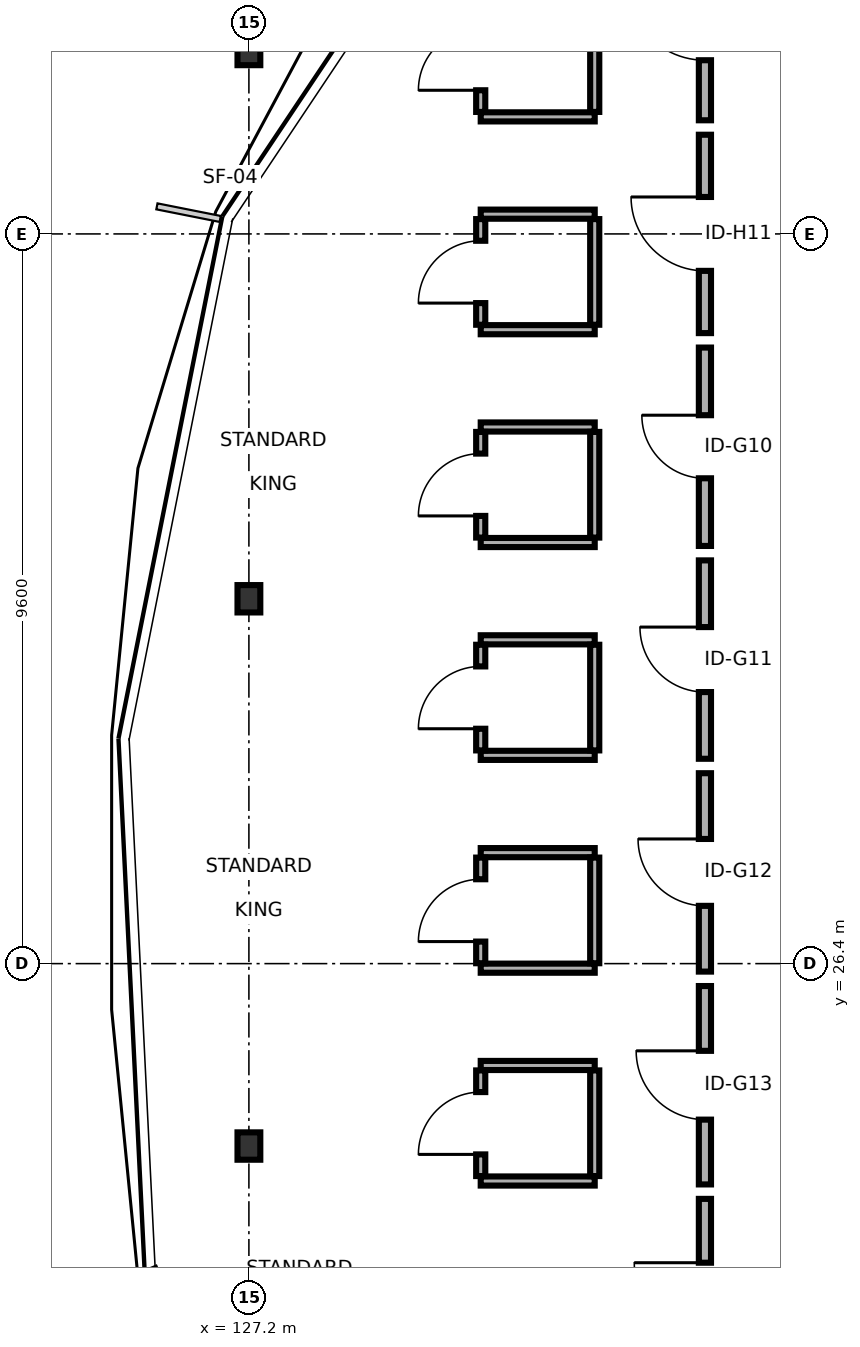
"""IFC4 building model, lengths in metres.
Left out: names, types, materials, properties, quantities, classifications, styles, units other than length and angle.
Written with IfcOpenShell. Run it as: python <this file> out.ifc"""

import sys

from ifc_helpers import new_model, si_unit, direction, frame, frame_2d, origin, origin_2d, place, context, subcontext, project, spatial, rectangle, i_section, extrude, element, fill, save


model = new_model("IFC4")
c1 = context("Model", 3, precision=1e-05, world=origin(), true_north=direction((0.0, 1.0)))
c2 = subcontext(c1, "Body", "Model", "MODEL_VIEW")
j1 = project(units=[si_unit("LENGTHUNIT", "METRE"), si_unit("PLANEANGLEUNIT", "RADIAN")], contexts=[c1])
p1 = place(None, origin())
s1 = spatial("IfcSite", under=j1, at=p1, CompositionType="ELEMENT")
p2 = place(p1, origin())
s2 = spatial("IfcBuilding", under=s1, at=p2, CompositionType="ELEMENT")
p3 = place(p2, frame((0.0, 0.0, 38.5)))
s3 = spatial("IfcBuildingStorey", under=s2, at=p3, CompositionType="ELEMENT", Elevation=38.5)
for number, where, z_axis, x_axis in (
    (1, (127.2, 38.4, 0.0), (0.0, 0.0, 1.0), (1.0, 0.0, 0.0)),
    (2, (127.2, 31.2, 0.0), (0.0, 0.0, 1.0), (1.0, 0.0, 0.0)),
    (3, (127.2, 24.0, 0.0), (0.0, 0.0, 1.0), (1.0, 0.0, 0.0)),
):
    element("IfcColumn", number, at=place(p3, frame(where, z_axis=z_axis, x_axis=x_axis)), inside=s3, PredefinedType="COLUMN", context=c2, shape_type="SweptSolid", body=[
        extrude(i_section(OverallWidth=0.3, OverallDepth=0.36, WebThickness=0.012, FlangeThickness=0.022, FilletRadius=0.027, at=origin_2d()), origin(), (0.0, 0.0, 1.0), 3.4),
    ])
p4 = place(p3, frame((133.2, 37.495, 0.0), z_axis=(0.0, 0.0, 1.0), x_axis=(0.0, 1.0, 0.0)))
e4 = element("IfcWall", 4, at=p4, inside=s3, PredefinedType="PARTITIONING", context=c2, shape_type="SweptSolid", body=[
    extrude(rectangle(XDim=2.61, YDim=0.16, at=frame_2d((1.305, 0.0))), origin(), (0.0, 0.0, 1.0), 2.735),
])
p5 = place(p4, frame((0.79, 0.0, 0.0)))
e5 = element("IfcOpeningElement", 5, at=p5, cuts=e4, PredefinedType="OPENING", context=c2, shape_type="SweptSolid", body=[
    extrude(rectangle(XDim=1.03, YDim=2.05, at=frame_2d((0.515, 1.025))), frame((0.0, 0.09, 0.0), z_axis=(0.0, -1.0, 0.0), x_axis=(1.0, 0.0, 0.0)), (0.0, 0.0, 1.0), 0.18),
])
p6 = place(p3, frame((130.25, 37.54, 0.0), z_axis=(0.0, 0.0, 1.0), x_axis=(1.0, 0.0, 0.0)))
e6 = element("IfcWall", 6, at=p6, inside=s3, PredefinedType="PARTITIONING", context=c2, shape_type="SweptSolid", body=[
    extrude(rectangle(XDim=1.5, YDim=0.12, at=frame_2d((0.75, 0.0))), origin(), (0.0, 0.0, 1.0), 3.15),
])
p7 = place(p3, frame((130.25, 37.605, 0.0), z_axis=(0.0, 0.0, 1.0), x_axis=(0.0, 1.0, 0.0)))
e7 = element("IfcWall", 7, at=p7, inside=s3, PredefinedType="PARTITIONING", context=c2, shape_type="SweptSolid", body=[
    extrude(rectangle(XDim=1.39, YDim=0.12, at=frame_2d((0.695, 0.0))), origin(), (0.0, 0.0, 1.0), 2.735),
])
p8 = place(p7, frame((0.285, 0.0, 0.0)))
e8 = element("IfcOpeningElement", 8, at=p8, cuts=e7, PredefinedType="OPENING", context=c2, shape_type="SweptSolid", body=[
    extrude(rectangle(XDim=0.82, YDim=2.08, at=frame_2d((0.41, 1.04))), frame((0.0, 0.07, 0.0), z_axis=(0.0, -1.0, 0.0), x_axis=(1.0, 0.0, 0.0)), (0.0, 0.0, 1.0), 0.14),
])
p9 = place(p3, frame((131.75, 37.605, 0.0), z_axis=(0.0, 0.0, 1.0), x_axis=(0.0, 1.0, 0.0)))
e9 = element("IfcWall", 9, at=p9, inside=s3, PredefinedType="PARTITIONING", context=c2, shape_type="SweptSolid", body=[
    extrude(rectangle(XDim=1.39, YDim=0.12, at=frame_2d((0.695, 0.0))), origin(), (0.0, 0.0, 1.0), 2.735),
])
p10 = place(p3, frame((133.2, 34.695, 0.0), z_axis=(0.0, 0.0, 1.0), x_axis=(0.0, 1.0, 0.0)))
e10 = element("IfcWall", 10, at=p10, inside=s3, PredefinedType="PARTITIONING", context=c2, shape_type="SweptSolid", body=[
    extrude(rectangle(XDim=2.61, YDim=0.16, at=frame_2d((1.305, 0.0))), origin(), (0.0, 0.0, 1.0), 3.15),
])
p11 = place(p10, frame((0.819, 0.0, 0.0)))
e11 = element("IfcOpeningElement", 11, at=p11, cuts=e10, PredefinedType="OPENING", context=c2, shape_type="SweptSolid", body=[
    extrude(rectangle(XDim=0.972, YDim=2.16, at=frame_2d((0.486, 1.08))), frame((0.0, 0.09, 0.0), z_axis=(0.0, -1.0, 0.0), x_axis=(1.0, 0.0, 0.0)), (0.0, 0.0, 1.0), 0.18),
])
for number, where, z_axis, x_axis in (
    (12, (130.25, 34.74, 0.0), (0.0, 0.0, 1.0), (1.0, 0.0, 0.0)),
    (13, (130.25, 36.26, 0.0), (0.0, 0.0, 1.0), (1.0, 0.0, 0.0)),
):
    element("IfcWall", number, at=place(p3, frame(where, z_axis=z_axis, x_axis=x_axis)), inside=s3, PredefinedType="PARTITIONING", context=c2, shape_type="SweptSolid", body=[
        extrude(rectangle(XDim=1.5, YDim=0.12, at=frame_2d((0.75, 0.0))), origin(), (0.0, 0.0, 1.0), 3.15),
    ])
p12 = place(p3, frame((130.25, 34.805, 0.0), z_axis=(0.0, 0.0, 1.0), x_axis=(0.0, 1.0, 0.0)))
e14 = element("IfcWall", 14, at=p12, inside=s3, PredefinedType="PARTITIONING", context=c2, shape_type="SweptSolid", body=[
    extrude(rectangle(XDim=1.39, YDim=0.12, at=frame_2d((0.695, 0.0))), origin(), (0.0, 0.0, 1.0), 3.15),
])
p13 = place(p12, frame((0.285, 0.0, 0.0)))
e15 = element("IfcOpeningElement", 15, at=p13, cuts=e14, PredefinedType="OPENING", context=c2, shape_type="SweptSolid", body=[
    extrude(rectangle(XDim=0.82, YDim=2.08, at=frame_2d((0.41, 1.04))), frame((0.0, 0.07, 0.0), z_axis=(0.0, -1.0, 0.0), x_axis=(1.0, 0.0, 0.0)), (0.0, 0.0, 1.0), 0.14),
])
p14 = place(p3, frame((131.75, 34.805, 0.0), z_axis=(0.0, 0.0, 1.0), x_axis=(0.0, 1.0, 0.0)))
e16 = element("IfcWall", 16, at=p14, inside=s3, PredefinedType="PARTITIONING", context=c2, shape_type="SweptSolid", body=[
    extrude(rectangle(XDim=1.39, YDim=0.12, at=frame_2d((0.695, 0.0))), origin(), (0.0, 0.0, 1.0), 3.15),
])
p15 = place(p3, frame((133.2, 31.895, 0.0), z_axis=(0.0, 0.0, 1.0), x_axis=(0.0, 1.0, 0.0)))
e17 = element("IfcWall", 17, at=p15, inside=s3, PredefinedType="PARTITIONING", context=c2, shape_type="SweptSolid", body=[
    extrude(rectangle(XDim=2.61, YDim=0.16, at=frame_2d((1.305, 0.0))), origin(), (0.0, 0.0, 1.0), 3.15),
])
p16 = place(p15, frame((0.89, 0.0, 0.0)))
e18 = element("IfcOpeningElement", 18, at=p16, cuts=e17, PredefinedType="OPENING", context=c2, shape_type="SweptSolid", body=[
    extrude(rectangle(XDim=0.83, YDim=2.11, at=frame_2d((0.415, 1.055))), frame((0.0, 0.09, 0.0), z_axis=(0.0, -1.0, 0.0), x_axis=(1.0, 0.0, 0.0)), (0.0, 0.0, 1.0), 0.18),
])
for number, where, z_axis, x_axis in (
    (19, (130.25, 31.94, 0.0), (0.0, 0.0, 1.0), (1.0, 0.0, 0.0)),
    (20, (130.25, 33.46, 0.0), (0.0, 0.0, 1.0), (1.0, 0.0, 0.0)),
):
    element("IfcWall", number, at=place(p3, frame(where, z_axis=z_axis, x_axis=x_axis)), inside=s3, PredefinedType="PARTITIONING", context=c2, shape_type="SweptSolid", body=[
        extrude(rectangle(XDim=1.5, YDim=0.12, at=frame_2d((0.75, 0.0))), origin(), (0.0, 0.0, 1.0), 3.15),
    ])
p17 = place(p3, frame((130.25, 32.005, 0.0), z_axis=(0.0, 0.0, 1.0), x_axis=(0.0, 1.0, 0.0)))
e21 = element("IfcWall", 21, at=p17, inside=s3, PredefinedType="PARTITIONING", context=c2, shape_type="SweptSolid", body=[
    extrude(rectangle(XDim=1.39, YDim=0.12, at=frame_2d((0.695, 0.0))), origin(), (0.0, 0.0, 1.0), 3.15),
])
p18 = place(p17, frame((0.285, 0.0, 0.0)))
e22 = element("IfcOpeningElement", 22, at=p18, cuts=e21, PredefinedType="OPENING", context=c2, shape_type="SweptSolid", body=[
    extrude(rectangle(XDim=0.82, YDim=2.08, at=frame_2d((0.41, 1.04))), frame((0.0, 0.07, 0.0), z_axis=(0.0, -1.0, 0.0), x_axis=(1.0, 0.0, 0.0)), (0.0, 0.0, 1.0), 0.14),
])
p19 = place(p3, frame((131.75, 32.005, 0.0), z_axis=(0.0, 0.0, 1.0), x_axis=(0.0, 1.0, 0.0)))
e23 = element("IfcWall", 23, at=p19, inside=s3, PredefinedType="PARTITIONING", context=c2, shape_type="SweptSolid", body=[
    extrude(rectangle(XDim=1.39, YDim=0.12, at=frame_2d((0.695, 0.0))), origin(), (0.0, 0.0, 1.0), 3.15),
])
p20 = place(p3, frame((133.2, 29.095, 0.0), z_axis=(0.0, 0.0, 1.0), x_axis=(0.0, 1.0, 0.0)))
e24 = element("IfcWall", 24, at=p20, inside=s3, PredefinedType="PARTITIONING", context=c2, shape_type="SweptSolid", body=[
    extrude(rectangle(XDim=2.61, YDim=0.16, at=frame_2d((1.305, 0.0))), origin(), (0.0, 0.0, 1.0), 2.735),
])
p21 = place(p20, frame((0.877, 0.0, 0.0)))
e25 = element("IfcOpeningElement", 25, at=p21, cuts=e24, PredefinedType="OPENING", context=c2, shape_type="SweptSolid", body=[
    extrude(rectangle(XDim=0.855, YDim=2.11, at=frame_2d((0.427, 1.055))), frame((0.0, 0.09, 0.0), z_axis=(0.0, -1.0, 0.0), x_axis=(1.0, 0.0, 0.0)), (0.0, 0.0, 1.0), 0.18),
])
for number, where, z_axis, x_axis in (
    (26, (130.25, 29.14, 0.0), (0.0, 0.0, 1.0), (1.0, 0.0, 0.0)),
    (27, (130.25, 30.66, 0.0), (0.0, 0.0, 1.0), (1.0, 0.0, 0.0)),
):
    element("IfcWall", number, at=place(p3, frame(where, z_axis=z_axis, x_axis=x_axis)), inside=s3, PredefinedType="PARTITIONING", context=c2, shape_type="SweptSolid", body=[
        extrude(rectangle(XDim=1.5, YDim=0.12, at=frame_2d((0.75, 0.0))), origin(), (0.0, 0.0, 1.0), 3.15),
    ])
p22 = place(p3, frame((130.25, 29.205, 0.0), z_axis=(0.0, 0.0, 1.0), x_axis=(0.0, 1.0, 0.0)))
e28 = element("IfcWall", 28, at=p22, inside=s3, PredefinedType="PARTITIONING", context=c2, shape_type="SweptSolid", body=[
    extrude(rectangle(XDim=1.39, YDim=0.12, at=frame_2d((0.695, 0.0))), origin(), (0.0, 0.0, 1.0), 3.15),
])
p23 = place(p22, frame((0.285, 0.0, 0.0)))
e29 = element("IfcOpeningElement", 29, at=p23, cuts=e28, PredefinedType="OPENING", context=c2, shape_type="SweptSolid", body=[
    extrude(rectangle(XDim=0.82, YDim=2.08, at=frame_2d((0.41, 1.04))), frame((0.0, 0.07, 0.0), z_axis=(0.0, -1.0, 0.0), x_axis=(1.0, 0.0, 0.0)), (0.0, 0.0, 1.0), 0.14),
])
p24 = place(p3, frame((131.75, 29.205, 0.0), z_axis=(0.0, 0.0, 1.0), x_axis=(0.0, 1.0, 0.0)))
e30 = element("IfcWall", 30, at=p24, inside=s3, PredefinedType="PARTITIONING", context=c2, shape_type="SweptSolid", body=[
    extrude(rectangle(XDim=1.39, YDim=0.12, at=frame_2d((0.695, 0.0))), origin(), (0.0, 0.0, 1.0), 3.15),
])
p25 = place(p3, frame((133.2, 26.295, 0.0), z_axis=(0.0, 0.0, 1.0), x_axis=(0.0, 1.0, 0.0)))
e31 = element("IfcWall", 31, at=p25, inside=s3, PredefinedType="PARTITIONING", context=c2, shape_type="SweptSolid", body=[
    extrude(rectangle(XDim=2.61, YDim=0.16, at=frame_2d((1.305, 0.0))), origin(), (0.0, 0.0, 1.0), 3.15),
])
p26 = place(p25, frame((0.865, 0.0, 0.0)))
e32 = element("IfcOpeningElement", 32, at=p26, cuts=e31, PredefinedType="OPENING", context=c2, shape_type="SweptSolid", body=[
    extrude(rectangle(XDim=0.88, YDim=2.11, at=frame_2d((0.44, 1.055))), frame((0.0, 0.09, 0.0), z_axis=(0.0, -1.0, 0.0), x_axis=(1.0, 0.0, 0.0)), (0.0, 0.0, 1.0), 0.18),
])
for number, where, z_axis, x_axis in (
    (33, (130.25, 26.34, 0.0), (0.0, 0.0, 1.0), (1.0, 0.0, 0.0)),
    (34, (130.25, 27.86, 0.0), (0.0, 0.0, 1.0), (1.0, 0.0, 0.0)),
):
    element("IfcWall", number, at=place(p3, frame(where, z_axis=z_axis, x_axis=x_axis)), inside=s3, PredefinedType="PARTITIONING", context=c2, shape_type="SweptSolid", body=[
        extrude(rectangle(XDim=1.5, YDim=0.12, at=frame_2d((0.75, 0.0))), origin(), (0.0, 0.0, 1.0), 3.15),
    ])
p27 = place(p3, frame((130.25, 26.405, 0.0), z_axis=(0.0, 0.0, 1.0), x_axis=(0.0, 1.0, 0.0)))
e35 = element("IfcWall", 35, at=p27, inside=s3, PredefinedType="PARTITIONING", context=c2, shape_type="SweptSolid", body=[
    extrude(rectangle(XDim=1.39, YDim=0.12, at=frame_2d((0.695, 0.0))), origin(), (0.0, 0.0, 1.0), 3.15),
])
p28 = place(p27, frame((0.285, 0.0, 0.0)))
e36 = element("IfcOpeningElement", 36, at=p28, cuts=e35, PredefinedType="OPENING", context=c2, shape_type="SweptSolid", body=[
    extrude(rectangle(XDim=0.82, YDim=2.08, at=frame_2d((0.41, 1.04))), frame((0.0, 0.07, 0.0), z_axis=(0.0, -1.0, 0.0), x_axis=(1.0, 0.0, 0.0)), (0.0, 0.0, 1.0), 0.14),
])
p29 = place(p3, frame((131.75, 26.405, 0.0), z_axis=(0.0, 0.0, 1.0), x_axis=(0.0, 1.0, 0.0)))
e37 = element("IfcWall", 37, at=p29, inside=s3, PredefinedType="PARTITIONING", context=c2, shape_type="SweptSolid", body=[
    extrude(rectangle(XDim=1.39, YDim=0.12, at=frame_2d((0.695, 0.0))), origin(), (0.0, 0.0, 1.0), 3.15),
])
p30 = place(p3, frame((133.2, 23.495, 0.0), z_axis=(0.0, 0.0, 1.0), x_axis=(0.0, 1.0, 0.0)))
e38 = element("IfcWall", 38, at=p30, inside=s3, PredefinedType="PARTITIONING", context=c2, shape_type="SweptSolid", body=[
    extrude(rectangle(XDim=2.61, YDim=0.16, at=frame_2d((1.305, 0.0))), origin(), (0.0, 0.0, 1.0), 2.735),
])
p31 = place(p30, frame((0.853, 0.0, 0.0)))
e39 = element("IfcOpeningElement", 39, at=p31, cuts=e38, PredefinedType="OPENING", context=c2, shape_type="SweptSolid", body=[
    extrude(rectangle(XDim=0.905, YDim=2.11, at=frame_2d((0.453, 1.055))), frame((0.0, 0.09, 0.0), z_axis=(0.0, -1.0, 0.0), x_axis=(1.0, 0.0, 0.0)), (0.0, 0.0, 1.0), 0.18),
])
for number, where, z_axis, x_axis in (
    (40, (130.25, 23.54, 0.0), (0.0, 0.0, 1.0), (1.0, 0.0, 0.0)),
    (41, (130.25, 25.06, 0.0), (0.0, 0.0, 1.0), (1.0, 0.0, 0.0)),
):
    element("IfcWall", number, at=place(p3, frame(where, z_axis=z_axis, x_axis=x_axis)), inside=s3, PredefinedType="PARTITIONING", context=c2, shape_type="SweptSolid", body=[
        extrude(rectangle(XDim=1.5, YDim=0.12, at=frame_2d((0.75, 0.0))), origin(), (0.0, 0.0, 1.0), 3.15),
    ])
p32 = place(p3, frame((130.25, 23.605, 0.0), z_axis=(0.0, 0.0, 1.0), x_axis=(0.0, 1.0, 0.0)))
e42 = element("IfcWall", 42, at=p32, inside=s3, PredefinedType="PARTITIONING", context=c2, shape_type="SweptSolid", body=[
    extrude(rectangle(XDim=1.39, YDim=0.12, at=frame_2d((0.695, 0.0))), origin(), (0.0, 0.0, 1.0), 2.735),
])
p33 = place(p32, frame((0.285, 0.0, 0.0)))
e43 = element("IfcOpeningElement", 43, at=p33, cuts=e42, PredefinedType="OPENING", context=c2, shape_type="SweptSolid", body=[
    extrude(rectangle(XDim=0.82, YDim=2.08, at=frame_2d((0.41, 1.04))), frame((0.0, 0.07, 0.0), z_axis=(0.0, -1.0, 0.0), x_axis=(1.0, 0.0, 0.0)), (0.0, 0.0, 1.0), 0.14),
])
p34 = place(p3, frame((131.75, 23.605, 0.0), z_axis=(0.0, 0.0, 1.0), x_axis=(0.0, 1.0, 0.0)))
e44 = element("IfcWall", 44, at=p34, inside=s3, PredefinedType="PARTITIONING", context=c2, shape_type="SweptSolid", body=[
    extrude(rectangle(XDim=1.39, YDim=0.12, at=frame_2d((0.695, 0.0))), origin(), (0.0, 0.0, 1.0), 2.735),
])
p35 = place(p3, frame((133.2, 20.695, 0.0), z_axis=(0.0, 0.0, 1.0), x_axis=(0.0, 1.0, 0.0)))
e45 = element("IfcWall", 45, at=p35, inside=s3, PredefinedType="PARTITIONING", context=c2, shape_type="SweptSolid", body=[
    extrude(rectangle(XDim=2.61, YDim=0.16, at=frame_2d((1.305, 0.0))), origin(), (0.0, 0.0, 1.0), 3.15),
])
p36 = place(p35, frame((0.84, 0.0, 0.0)))
e46 = element("IfcOpeningElement", 46, at=p36, cuts=e45, PredefinedType="OPENING", context=c2, shape_type="SweptSolid", body=[
    extrude(rectangle(XDim=0.93, YDim=2.11, at=frame_2d((0.465, 1.055))), frame((0.0, 0.09, 0.0), z_axis=(0.0, -1.0, 0.0), x_axis=(1.0, 0.0, 0.0)), (0.0, 0.0, 1.0), 0.18),
])
p37 = place(p5, origin())
e47 = element("IfcDoor", 47, at=p37, inside=s3, OperationType="SINGLE_SWING_RIGHT", PredefinedType="DOOR", context=c2, shape_type="SweptSolid", body=[
    extrude(rectangle(XDim=1.03, YDim=2.05, at=frame_2d((0.515, 1.025))), frame((0.0, 0.025, 0.0), z_axis=(0.0, -1.0, 0.0), x_axis=(1.0, 0.0, 0.0)), (0.0, 0.0, 1.0), 0.05),
])
fill(e5, e47)
p38 = place(p8, origin())
e48 = element("IfcDoor", 48, at=p38, inside=s3, OperationType="SINGLE_SWING_LEFT", PredefinedType="DOOR", context=c2, shape_type="SweptSolid", body=[
    extrude(rectangle(XDim=0.82, YDim=2.08, at=frame_2d((0.41, 1.04))), frame((0.0, 0.025, 0.0), z_axis=(0.0, -1.0, 0.0), x_axis=(1.0, 0.0, 0.0)), (0.0, 0.0, 1.0), 0.05),
])
fill(e8, e48)
p39 = place(p11, origin())
e49 = element("IfcDoor", 49, at=p39, inside=s3, OperationType="SINGLE_SWING_RIGHT", PredefinedType="DOOR", context=c2, shape_type="SweptSolid", body=[
    extrude(rectangle(XDim=0.972, YDim=2.16, at=frame_2d((0.486, 1.08))), frame((0.0, 0.025, 0.0), z_axis=(0.0, -1.0, 0.0), x_axis=(1.0, 0.0, 0.0)), (0.0, 0.0, 1.0), 0.05),
])
fill(e11, e49)
p40 = place(p13, origin())
e50 = element("IfcDoor", 50, at=p40, inside=s3, OperationType="SINGLE_SWING_LEFT", PredefinedType="DOOR", context=c2, shape_type="SweptSolid", body=[
    extrude(rectangle(XDim=0.82, YDim=2.08, at=frame_2d((0.41, 1.04))), frame((0.0, 0.025, 0.0), z_axis=(0.0, -1.0, 0.0), x_axis=(1.0, 0.0, 0.0)), (0.0, 0.0, 1.0), 0.05),
])
fill(e15, e50)
p41 = place(p16, origin())
e51 = element("IfcDoor", 51, at=p41, inside=s3, OperationType="SINGLE_SWING_RIGHT", PredefinedType="DOOR", context=c2, shape_type="SweptSolid", body=[
    extrude(rectangle(XDim=0.83, YDim=2.11, at=frame_2d((0.415, 1.055))), frame((0.0, 0.025, 0.0), z_axis=(0.0, -1.0, 0.0), x_axis=(1.0, 0.0, 0.0)), (0.0, 0.0, 1.0), 0.05),
])
fill(e18, e51)
p42 = place(p18, origin())
e52 = element("IfcDoor", 52, at=p42, inside=s3, OperationType="SINGLE_SWING_LEFT", PredefinedType="DOOR", context=c2, shape_type="SweptSolid", body=[
    extrude(rectangle(XDim=0.82, YDim=2.08, at=frame_2d((0.41, 1.04))), frame((0.0, 0.025, 0.0), z_axis=(0.0, -1.0, 0.0), x_axis=(1.0, 0.0, 0.0)), (0.0, 0.0, 1.0), 0.05),
])
fill(e22, e52)
p43 = place(p21, origin())
e53 = element("IfcDoor", 53, at=p43, inside=s3, OperationType="SINGLE_SWING_RIGHT", PredefinedType="DOOR", context=c2, shape_type="SweptSolid", body=[
    extrude(rectangle(XDim=0.855, YDim=2.11, at=frame_2d((0.427, 1.055))), frame((0.0, 0.025, 0.0), z_axis=(0.0, -1.0, 0.0), x_axis=(1.0, 0.0, 0.0)), (0.0, 0.0, 1.0), 0.05),
])
fill(e25, e53)
p44 = place(p23, origin())
e54 = element("IfcDoor", 54, at=p44, inside=s3, OperationType="SINGLE_SWING_LEFT", PredefinedType="DOOR", context=c2, shape_type="SweptSolid", body=[
    extrude(rectangle(XDim=0.82, YDim=2.08, at=frame_2d((0.41, 1.04))), frame((0.0, 0.025, 0.0), z_axis=(0.0, -1.0, 0.0), x_axis=(1.0, 0.0, 0.0)), (0.0, 0.0, 1.0), 0.05),
])
fill(e29, e54)
p45 = place(p26, origin())
e55 = element("IfcDoor", 55, at=p45, inside=s3, OperationType="SINGLE_SWING_RIGHT", PredefinedType="DOOR", context=c2, shape_type="SweptSolid", body=[
    extrude(rectangle(XDim=0.88, YDim=2.11, at=frame_2d((0.44, 1.055))), frame((0.0, 0.025, 0.0), z_axis=(0.0, -1.0, 0.0), x_axis=(1.0, 0.0, 0.0)), (0.0, 0.0, 1.0), 0.05),
])
fill(e32, e55)
p46 = place(p28, origin())
e56 = element("IfcDoor", 56, at=p46, inside=s3, OperationType="SINGLE_SWING_LEFT", PredefinedType="DOOR", context=c2, shape_type="SweptSolid", body=[
    extrude(rectangle(XDim=0.82, YDim=2.08, at=frame_2d((0.41, 1.04))), frame((0.0, 0.025, 0.0), z_axis=(0.0, -1.0, 0.0), x_axis=(1.0, 0.0, 0.0)), (0.0, 0.0, 1.0), 0.05),
])
fill(e36, e56)
p47 = place(p31, origin())
e57 = element("IfcDoor", 57, at=p47, inside=s3, OperationType="SINGLE_SWING_RIGHT", PredefinedType="DOOR", context=c2, shape_type="SweptSolid", body=[
    extrude(rectangle(XDim=0.905, YDim=2.11, at=frame_2d((0.453, 1.055))), frame((0.0, 0.025, 0.0), z_axis=(0.0, -1.0, 0.0), x_axis=(1.0, 0.0, 0.0)), (0.0, 0.0, 1.0), 0.05),
])
fill(e39, e57)
p48 = place(p33, origin())
e58 = element("IfcDoor", 58, at=p48, inside=s3, OperationType="SINGLE_SWING_LEFT", PredefinedType="DOOR", context=c2, shape_type="SweptSolid", body=[
    extrude(rectangle(XDim=0.82, YDim=2.08, at=frame_2d((0.41, 1.04))), frame((0.0, 0.025, 0.0), z_axis=(0.0, -1.0, 0.0), x_axis=(1.0, 0.0, 0.0)), (0.0, 0.0, 1.0), 0.05),
])
fill(e43, e58)
p49 = place(p36, origin())
e59 = element("IfcDoor", 59, at=p49, inside=s3, OperationType="SINGLE_SWING_RIGHT", PredefinedType="DOOR", context=c2, shape_type="SweptSolid", body=[
    extrude(rectangle(XDim=0.93, YDim=2.11, at=frame_2d((0.465, 1.055))), frame((0.0, 0.025, 0.0), z_axis=(0.0, -1.0, 0.0), x_axis=(1.0, 0.0, 0.0)), (0.0, 0.0, 1.0), 0.05),
])
fill(e46, e59)
save(model, sys.argv[1])
